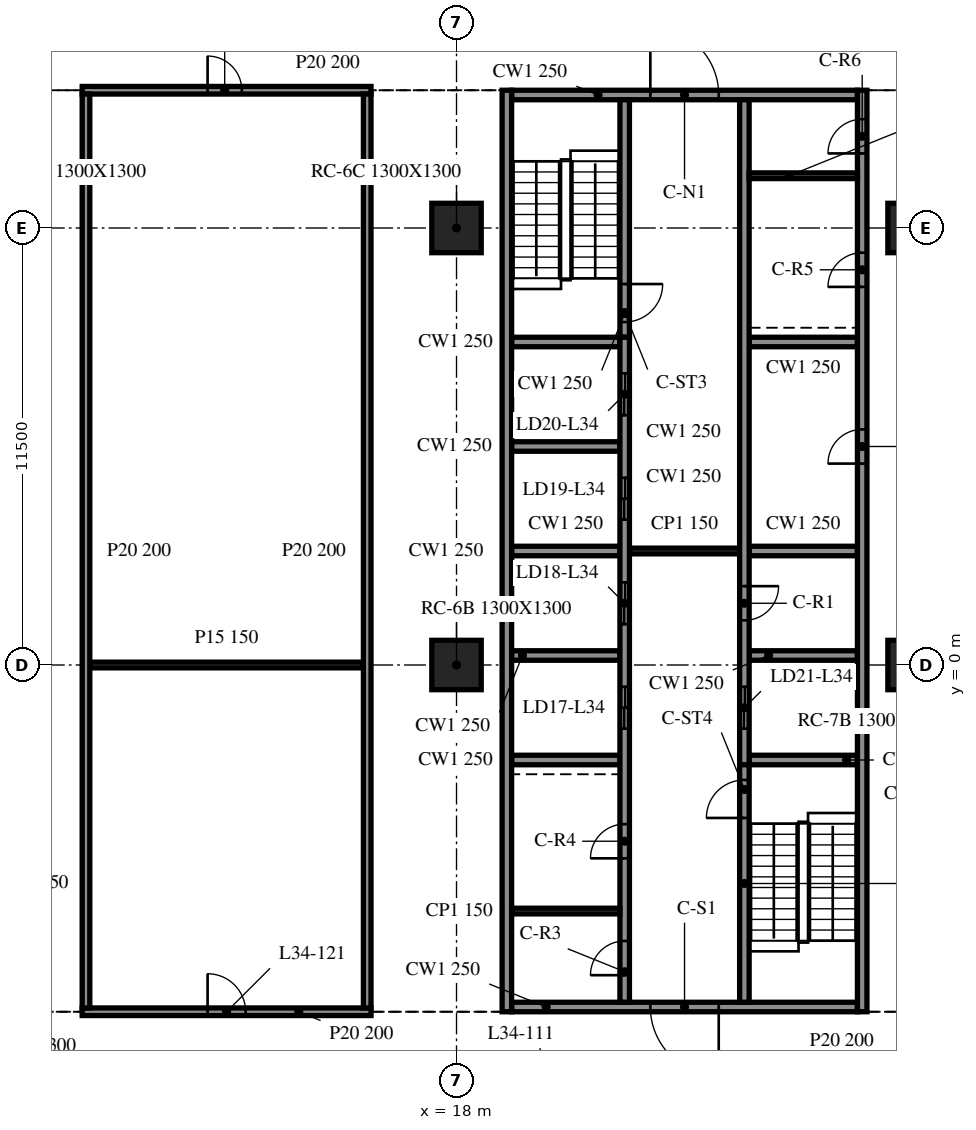
"""IFC4 building model, lengths in metres.
Left out: names, types, materials, properties, quantities, classifications, styles, units other than length and angle.
Written with IfcOpenShell. Run it as: python <this file> out.ifc"""

import sys

from ifc_helpers import new_model, si_unit, direction, frame, frame_2d, origin, origin_2d, place, context, subcontext, project, spatial, rectangle, extrude, element, fill, save


model = new_model("IFC4")
c1 = context("Model", 3, precision=1e-05, world=origin(), true_north=direction((0.0, 1.0)))
c2 = subcontext(c1, "Body", "Model", "MODEL_VIEW")
j1 = project(units=[si_unit("LENGTHUNIT", "METRE"), si_unit("PLANEANGLEUNIT", "RADIAN")], contexts=[c1])
p1 = place(None, origin())
s1 = spatial("IfcSite", under=j1, at=p1, CompositionType="ELEMENT")
p2 = place(p1, origin())
s2 = spatial("IfcBuilding", under=s1, at=p2, CompositionType="ELEMENT")
p3 = place(p2, frame((0.0, 0.0, 146.6)))
s3 = spatial("IfcBuildingStorey", under=s2, at=p3, CompositionType="ELEMENT", Elevation=146.6)
for number, where, z_axis, x_axis in (
    (1, (18.0, 0.0, -0.34), (0.0, 0.0, 1.0), (1.0, 0.0, 0.0)),
    (2, (18.0, 11.5, -0.34), (0.0, 0.0, 1.0), (1.0, 0.0, 0.0)),
    (3, (30.0, 0.0, -0.34), (0.0, 0.0, 1.0), (1.0, 0.0, 0.0)),
    (4, (30.0, 11.5, -0.34), (0.0, 0.0, 1.0), (1.0, 0.0, 0.0)),
):
    element("IfcColumn", number, at=place(p3, frame(where, z_axis=z_axis, x_axis=x_axis)), inside=s3, PredefinedType="COLUMN", context=c2, shape_type="SweptSolid", body=[
        extrude(rectangle(XDim=1.3, YDim=1.3, at=origin_2d()), origin(), (0.0, 0.0, 1.0), 4.1),
    ])
p4 = place(p3, frame((19.325, 15.125, 0.0), z_axis=(0.0, 0.0, 1.0), x_axis=(0.0, -1.0, 0.0)))
e5 = element("IfcWall", 5, at=p4, inside=s3, PredefinedType="SOLIDWALL", context=c2, shape_type="SweptSolid", body=[
    extrude(rectangle(XDim=24.25, YDim=0.25, at=frame_2d((12.125, 0.0))), origin(), (0.0, 0.0, 1.0), 3.76),
])
p5 = place(p3, frame((28.675, -9.125, 0.0), z_axis=(0.0, 0.0, 1.0), x_axis=(0.0, 1.0, 0.0)))
e6 = element("IfcWall", 6, at=p5, inside=s3, PredefinedType="SOLIDWALL", context=c2, shape_type="SweptSolid", body=[
    extrude(rectangle(XDim=24.25, YDim=0.25, at=frame_2d((12.125, 0.0))), origin(), (0.0, 0.0, 1.0), 3.76),
])
p6 = place(p5, frame((14.425, 0.0, 0.0)))
e7 = element("IfcOpeningElement", 7, at=p6, cuts=e6, PredefinedType="OPENING", context=c2, shape_type="SweptSolid", body=[
    extrude(rectangle(XDim=0.9, YDim=2.1, at=frame_2d((0.45, 1.05))), frame((0.0, 0.135, 0.0), z_axis=(0.0, -1.0, 0.0), x_axis=(1.0, 0.0, 0.0)), (0.0, 0.0, 1.0), 0.27),
])
p7 = place(p5, frame((19.075, 0.0, 0.0)))
e8 = element("IfcOpeningElement", 8, at=p7, cuts=e6, PredefinedType="OPENING", context=c2, shape_type="SweptSolid", body=[
    extrude(rectangle(XDim=0.9, YDim=2.1, at=frame_2d((0.45, 1.05))), frame((0.0, 0.135, 0.0), z_axis=(0.0, -1.0, 0.0), x_axis=(1.0, 0.0, 0.0)), (0.0, 0.0, 1.0), 0.27),
])
p8 = place(p5, frame((22.587, 0.0, 0.0)))
e9 = element("IfcOpeningElement", 9, at=p8, cuts=e6, PredefinedType="OPENING", context=c2, shape_type="SweptSolid", body=[
    extrude(rectangle(XDim=0.9, YDim=2.1, at=frame_2d((0.45, 1.05))), frame((0.0, 0.135, 0.0), z_axis=(0.0, -1.0, 0.0), x_axis=(1.0, 0.0, 0.0)), (0.0, 0.0, 1.0), 0.27),
])
p9 = place(p3, frame((28.55, -9.0, 0.0), z_axis=(0.0, 0.0, 1.0), x_axis=(-1.0, 0.0, 0.0)))
e10 = element("IfcWall", 10, at=p9, inside=s3, PredefinedType="SOLIDWALL", context=c2, shape_type="SweptSolid", body=[
    extrude(rectangle(XDim=9.1, YDim=0.25, at=frame_2d((4.55, 0.0))), origin(), (0.0, 0.0, 1.0), 3.76),
])
p10 = place(p9, frame((3.65, 0.0, 0.0)))
e11 = element("IfcOpeningElement", 11, at=p10, cuts=e10, PredefinedType="OPENING", context=c2, shape_type="SweptSolid", body=[
    extrude(rectangle(XDim=1.8, YDim=2.1, at=frame_2d((0.9, 1.05))), frame((0.0, 0.135, 0.0), z_axis=(0.0, -1.0, 0.0), x_axis=(1.0, 0.0, 0.0)), (0.0, 0.0, 1.0), 0.27),
])
p11 = place(p3, frame((19.45, 15.0, 0.0), z_axis=(0.0, 0.0, 1.0), x_axis=(1.0, 0.0, 0.0)))
e12 = element("IfcWall", 12, at=p11, inside=s3, PredefinedType="SOLIDWALL", context=c2, shape_type="SweptSolid", body=[
    extrude(rectangle(XDim=9.1, YDim=0.25, at=frame_2d((4.55, 0.0))), origin(), (0.0, 0.0, 1.0), 3.76),
])
p12 = place(p11, frame((3.65, 0.0, 0.0)))
e13 = element("IfcOpeningElement", 13, at=p12, cuts=e12, PredefinedType="OPENING", context=c2, shape_type="SweptSolid", body=[
    extrude(rectangle(XDim=1.8, YDim=2.1, at=frame_2d((0.9, 1.05))), frame((0.0, 0.135, 0.0), z_axis=(0.0, -1.0, 0.0), x_axis=(1.0, 0.0, 0.0)), (0.0, 0.0, 1.0), 0.27),
])
p13 = place(p3, frame((22.425, -8.875, 0.0), z_axis=(0.0, 0.0, 1.0), x_axis=(0.0, 1.0, 0.0)))
e14 = element("IfcWall", 14, at=p13, inside=s3, PredefinedType="SOLIDWALL", context=c2, shape_type="SweptSolid", body=[
    extrude(rectangle(XDim=17.5, YDim=0.25, at=frame_2d((8.75, 0.0))), origin(), (0.0, 0.0, 1.0), 3.76),
])
p14 = place(p13, frame((7.2, 0.0, 0.0)))
e15 = element("IfcOpeningElement", 15, at=p14, cuts=e14, PredefinedType="OPENING", context=c2, shape_type="SweptSolid", body=[
    extrude(rectangle(XDim=1.1, YDim=2.1, at=frame_2d((0.55, 1.05))), frame((0.0, 0.135, 0.0), z_axis=(0.0, -1.0, 0.0), x_axis=(1.0, 0.0, 0.0)), (0.0, 0.0, 1.0), 0.27),
])
p15 = place(p13, frame((9.95, 0.0, 0.0)))
e16 = element("IfcOpeningElement", 16, at=p15, cuts=e14, PredefinedType="OPENING", context=c2, shape_type="SweptSolid", body=[
    extrude(rectangle(XDim=1.1, YDim=2.1, at=frame_2d((0.55, 1.05))), frame((0.0, 0.135, 0.0), z_axis=(0.0, -1.0, 0.0), x_axis=(1.0, 0.0, 0.0)), (0.0, 0.0, 1.0), 0.27),
])
p16 = place(p13, frame((12.7, 0.0, 0.0)))
e17 = element("IfcOpeningElement", 17, at=p16, cuts=e14, PredefinedType="OPENING", context=c2, shape_type="SweptSolid", body=[
    extrude(rectangle(XDim=1.1, YDim=2.1, at=frame_2d((0.55, 1.05))), frame((0.0, 0.135, 0.0), z_axis=(0.0, -1.0, 0.0), x_axis=(1.0, 0.0, 0.0)), (0.0, 0.0, 1.0), 0.27),
])
p17 = place(p13, frame((15.45, 0.0, 0.0)))
e18 = element("IfcOpeningElement", 18, at=p17, cuts=e14, PredefinedType="OPENING", context=c2, shape_type="SweptSolid", body=[
    extrude(rectangle(XDim=1.1, YDim=2.1, at=frame_2d((0.55, 1.05))), frame((0.0, 0.135, 0.0), z_axis=(0.0, -1.0, 0.0), x_axis=(1.0, 0.0, 0.0)), (0.0, 0.0, 1.0), 0.27),
])
p18 = place(p13, frame((0.712, 0.0, 0.0)))
e19 = element("IfcOpeningElement", 19, at=p18, cuts=e14, PredefinedType="OPENING", context=c2, shape_type="SweptSolid", body=[
    extrude(rectangle(XDim=0.9, YDim=2.1, at=frame_2d((0.45, 1.05))), frame((0.0, 0.135, 0.0), z_axis=(0.0, -1.0, 0.0), x_axis=(1.0, 0.0, 0.0)), (0.0, 0.0, 1.0), 0.27),
])
p19 = place(p13, frame((3.788, 0.0, 0.0)))
e20 = element("IfcOpeningElement", 20, at=p19, cuts=e14, PredefinedType="OPENING", context=c2, shape_type="SweptSolid", body=[
    extrude(rectangle(XDim=0.9, YDim=2.1, at=frame_2d((0.45, 1.05))), frame((0.0, 0.135, 0.0), z_axis=(0.0, -1.0, 0.0), x_axis=(1.0, 0.0, 0.0)), (0.0, 0.0, 1.0), 0.27),
])
p20 = place(p3, frame((22.425, 14.875, 0.0), z_axis=(0.0, 0.0, 1.0), x_axis=(0.0, -1.0, 0.0)))
e21 = element("IfcWall", 21, at=p20, inside=s3, PredefinedType="SOLIDWALL", context=c2, shape_type="SweptSolid", body=[
    extrude(rectangle(XDim=6.25, YDim=0.25, at=frame_2d((3.125, 0.0))), origin(), (0.0, 0.0, 1.0), 3.76),
])
p21 = place(p20, frame((4.85, 0.0, 0.0)))
e22 = element("IfcOpeningElement", 22, at=p21, cuts=e21, PredefinedType="OPENING", context=c2, shape_type="SweptSolid", body=[
    extrude(rectangle(XDim=1.0, YDim=2.1, at=frame_2d((0.5, 1.05))), frame((0.0, 0.135, 0.0), z_axis=(0.0, -1.0, 0.0), x_axis=(1.0, 0.0, 0.0)), (0.0, 0.0, 1.0), 0.27),
])
p22 = place(p3, frame((25.575, -8.875, 0.0), z_axis=(0.0, 0.0, 1.0), x_axis=(0.0, 1.0, 0.0)))
e23 = element("IfcWall", 23, at=p22, inside=s3, PredefinedType="SOLIDWALL", context=c2, shape_type="SweptSolid", body=[
    extrude(rectangle(XDim=6.25, YDim=0.25, at=frame_2d((3.125, 0.0))), origin(), (0.0, 0.0, 1.0), 3.76),
])
p23 = place(p22, frame((4.85, 0.0, 0.0)))
e24 = element("IfcOpeningElement", 24, at=p23, cuts=e23, PredefinedType="OPENING", context=c2, shape_type="SweptSolid", body=[
    extrude(rectangle(XDim=1.0, YDim=2.1, at=frame_2d((0.5, 1.05))), frame((0.0, 0.135, 0.0), z_axis=(0.0, -1.0, 0.0), x_axis=(1.0, 0.0, 0.0)), (0.0, 0.0, 1.0), 0.27),
])
p24 = place(p3, frame((25.575, 14.875, 0.0), z_axis=(0.0, 0.0, 1.0), x_axis=(0.0, -1.0, 0.0)))
e25 = element("IfcWall", 25, at=p24, inside=s3, PredefinedType="SOLIDWALL", context=c2, shape_type="SweptSolid", body=[
    extrude(rectangle(XDim=17.5, YDim=0.25, at=frame_2d((8.75, 0.0))), origin(), (0.0, 0.0, 1.0), 3.76),
])
p25 = place(p24, frame((15.45, 0.0, 0.0)))
e26 = element("IfcOpeningElement", 26, at=p25, cuts=e25, PredefinedType="OPENING", context=c2, shape_type="SweptSolid", body=[
    extrude(rectangle(XDim=1.1, YDim=2.1, at=frame_2d((0.55, 1.05))), frame((0.0, 0.135, 0.0), z_axis=(0.0, -1.0, 0.0), x_axis=(1.0, 0.0, 0.0)), (0.0, 0.0, 1.0), 0.27),
])
p26 = place(p24, frame((12.8, 0.0, 0.0)))
e27 = element("IfcOpeningElement", 27, at=p26, cuts=e25, PredefinedType="OPENING", context=c2, shape_type="SweptSolid", body=[
    extrude(rectangle(XDim=0.9, YDim=2.1, at=frame_2d((0.45, 1.05))), frame((0.0, 0.135, 0.0), z_axis=(0.0, -1.0, 0.0), x_axis=(1.0, 0.0, 0.0)), (0.0, 0.0, 1.0), 0.27),
])
for number, where, z_axis, x_axis in (
    (28, (19.45, -2.5, 0.0), (0.0, 0.0, 1.0), (1.0, 0.0, 0.0)),
    (29, (19.45, 0.25, 0.0), (0.0, 0.0, 1.0), (1.0, 0.0, 0.0)),
    (30, (19.45, 3.0, 0.0), (0.0, 0.0, 1.0), (1.0, 0.0, 0.0)),
    (31, (19.45, 5.75, 0.0), (0.0, 0.0, 1.0), (1.0, 0.0, 0.0)),
    (32, (19.45, 8.5, 0.0), (0.0, 0.0, 1.0), (1.0, 0.0, 0.0)),
    (33, (25.7, -2.5, 0.0), (0.0, 0.0, 1.0), (1.0, 0.0, 0.0)),
    (34, (25.7, 0.25, 0.0), (0.0, 0.0, 1.0), (1.0, 0.0, 0.0)),
    (35, (25.7, 3.0, 0.0), (0.0, 0.0, 1.0), (1.0, 0.0, 0.0)),
    (36, (25.7, 8.5, 0.0), (0.0, 0.0, 1.0), (1.0, 0.0, 0.0)),
):
    element("IfcWall", number, at=place(p3, frame(where, z_axis=z_axis, x_axis=x_axis)), inside=s3, PredefinedType="SOLIDWALL", context=c2, shape_type="SweptSolid", body=[
        extrude(rectangle(XDim=2.85, YDim=0.25, at=frame_2d((1.425, 0.0))), origin(), (0.0, 0.0, 1.0), 3.76),
    ])
p27 = place(p3, frame((22.55, 3.0, 0.0), z_axis=(0.0, 0.0, 1.0), x_axis=(1.0, 0.0, 0.0)))
e37 = element("IfcWall", 37, at=p27, inside=s3, PredefinedType="PARTITIONING", context=c2, shape_type="SweptSolid", body=[
    extrude(rectangle(XDim=2.9, YDim=0.15, at=frame_2d((1.45, 0.0))), origin(), (0.0, 0.0, 1.0), 3.76),
])
for number, where, z_axis, x_axis in (
    (38, (19.45, -6.475, 0.0), (0.0, 0.0, 1.0), (1.0, 0.0, 0.0)),
    (39, (25.7, 12.875, 0.0), (0.0, 0.0, 1.0), (1.0, 0.0, 0.0)),
):
    element("IfcWall", number, at=place(p3, frame(where, z_axis=z_axis, x_axis=x_axis)), inside=s3, PredefinedType="PARTITIONING", context=c2, shape_type="SweptSolid", body=[
        extrude(rectangle(XDim=2.85, YDim=0.15, at=frame_2d((1.425, 0.0))), origin(), (0.0, 0.0, 1.0), 3.76),
    ])
p28 = place(p3, frame((8.15, -9.125, 0.0), z_axis=(0.0, 0.0, 1.0), x_axis=(1.0, 0.0, 0.0)))
e40 = element("IfcWall", 40, at=p28, inside=s3, PredefinedType="PARTITIONING", context=c2, shape_type="SweptSolid", body=[
    extrude(rectangle(XDim=7.6, YDim=0.2, at=frame_2d((3.8, 0.0))), origin(), (0.0, 0.0, 1.0), 3.76),
])
p29 = place(p28, frame((3.3, 0.0, 0.0)))
e41 = element("IfcOpeningElement", 41, at=p29, cuts=e40, PredefinedType="OPENING", context=c2, shape_type="SweptSolid", body=[
    extrude(rectangle(XDim=1.0, YDim=2.1, at=frame_2d((0.5, 1.05))), frame((0.0, 0.11, 0.0), z_axis=(0.0, -1.0, 0.0), x_axis=(1.0, 0.0, 0.0)), (0.0, 0.0, 1.0), 0.22),
])
p30 = place(p3, frame((8.35, 0.0, 0.0), z_axis=(0.0, 0.0, 1.0), x_axis=(1.0, 0.0, 0.0)))
e42 = element("IfcWall", 42, at=p30, inside=s3, PredefinedType="PARTITIONING", context=c2, shape_type="SweptSolid", body=[
    extrude(rectangle(XDim=7.2, YDim=0.15, at=frame_2d((3.6, 0.0))), origin(), (0.0, 0.0, 1.0), 3.76),
])
p31 = place(p3, frame((8.15, 15.125, 0.0), z_axis=(0.0, 0.0, 1.0), x_axis=(1.0, 0.0, 0.0)))
e43 = element("IfcWall", 43, at=p31, inside=s3, PredefinedType="PARTITIONING", context=c2, shape_type="SweptSolid", body=[
    extrude(rectangle(XDim=7.6, YDim=0.2, at=frame_2d((3.8, 0.0))), origin(), (0.0, 0.0, 1.0), 3.76),
])
p32 = place(p31, frame((3.3, 0.0, 0.0)))
e44 = element("IfcOpeningElement", 44, at=p32, cuts=e43, PredefinedType="OPENING", context=c2, shape_type="SweptSolid", body=[
    extrude(rectangle(XDim=0.9, YDim=2.1, at=frame_2d((0.45, 1.05))), frame((0.0, 0.11, 0.0), z_axis=(0.0, -1.0, 0.0), x_axis=(1.0, 0.0, 0.0)), (0.0, 0.0, 1.0), 0.22),
])
for number, where, z_axis, x_axis in (
    (45, (8.25, -9.025, 0.0), (0.0, 0.0, 1.0), (0.0, 1.0, 0.0)),
    (46, (15.65, -9.025, 0.0), (0.0, 0.0, 1.0), (0.0, 1.0, 0.0)),
):
    element("IfcWall", number, at=place(p3, frame(where, z_axis=z_axis, x_axis=x_axis)), inside=s3, PredefinedType="PARTITIONING", context=c2, shape_type="SweptSolid", body=[
        extrude(rectangle(XDim=24.05, YDim=0.2, at=frame_2d((12.025, 0.0))), origin(), (0.0, 0.0, 1.0), 3.76),
    ])
p33 = place(p10, origin())
e47 = element("IfcDoor", 47, at=p33, inside=s3, OperationType="DOUBLE_DOOR_SINGLE_SWING", PredefinedType="DOOR", context=c2, shape_type="SweptSolid", body=[
    extrude(rectangle(XDim=1.8, YDim=2.1, at=frame_2d((0.9, 1.05))), frame((0.0, 0.025, 0.0), z_axis=(0.0, -1.0, 0.0), x_axis=(1.0, 0.0, 0.0)), (0.0, 0.0, 1.0), 0.05),
])
fill(e11, e47)
p34 = place(p12, origin())
e48 = element("IfcDoor", 48, at=p34, inside=s3, OperationType="DOUBLE_DOOR_SINGLE_SWING", PredefinedType="DOOR", context=c2, shape_type="SweptSolid", body=[
    extrude(rectangle(XDim=1.8, YDim=2.1, at=frame_2d((0.9, 1.05))), frame((0.0, 0.025, 0.0), z_axis=(0.0, -1.0, 0.0), x_axis=(1.0, 0.0, 0.0)), (0.0, 0.0, 1.0), 0.05),
])
fill(e13, e48)
p35 = place(p25, origin())
e49 = element("IfcDoor", 49, at=p35, inside=s3, OperationType="DOUBLE_DOOR_SLIDING", PredefinedType="DOOR", context=c2, shape_type="SweptSolid", body=[
    extrude(rectangle(XDim=1.1, YDim=2.1, at=frame_2d((0.55, 1.05))), frame((0.0, 0.025, 0.0), z_axis=(0.0, -1.0, 0.0), x_axis=(1.0, 0.0, 0.0)), (0.0, 0.0, 1.0), 0.05),
])
fill(e26, e49)
p36 = place(p14, origin())
e50 = element("IfcDoor", 50, at=p36, inside=s3, OperationType="DOUBLE_DOOR_SLIDING", PredefinedType="DOOR", context=c2, shape_type="SweptSolid", body=[
    extrude(rectangle(XDim=1.1, YDim=2.1, at=frame_2d((0.55, 1.05))), frame((0.0, 0.025, 0.0), z_axis=(0.0, -1.0, 0.0), x_axis=(1.0, 0.0, 0.0)), (0.0, 0.0, 1.0), 0.05),
])
fill(e15, e50)
p37 = place(p15, origin())
e51 = element("IfcDoor", 51, at=p37, inside=s3, OperationType="DOUBLE_DOOR_SLIDING", PredefinedType="DOOR", context=c2, shape_type="SweptSolid", body=[
    extrude(rectangle(XDim=1.1, YDim=2.1, at=frame_2d((0.55, 1.05))), frame((0.0, 0.025, 0.0), z_axis=(0.0, -1.0, 0.0), x_axis=(1.0, 0.0, 0.0)), (0.0, 0.0, 1.0), 0.05),
])
fill(e16, e51)
p38 = place(p16, origin())
e52 = element("IfcDoor", 52, at=p38, inside=s3, OperationType="DOUBLE_DOOR_SLIDING", PredefinedType="DOOR", context=c2, shape_type="SweptSolid", body=[
    extrude(rectangle(XDim=1.1, YDim=2.1, at=frame_2d((0.55, 1.05))), frame((0.0, 0.025, 0.0), z_axis=(0.0, -1.0, 0.0), x_axis=(1.0, 0.0, 0.0)), (0.0, 0.0, 1.0), 0.05),
])
fill(e17, e52)
p39 = place(p17, origin())
e53 = element("IfcDoor", 53, at=p39, inside=s3, OperationType="DOUBLE_DOOR_SLIDING", PredefinedType="DOOR", context=c2, shape_type="SweptSolid", body=[
    extrude(rectangle(XDim=1.1, YDim=2.1, at=frame_2d((0.55, 1.05))), frame((0.0, 0.025, 0.0), z_axis=(0.0, -1.0, 0.0), x_axis=(1.0, 0.0, 0.0)), (0.0, 0.0, 1.0), 0.05),
])
fill(e18, e53)
p40 = place(p26, origin())
e54 = element("IfcDoor", 54, at=p40, inside=s3, OperationType="SINGLE_SWING_LEFT", PredefinedType="DOOR", context=c2, shape_type="SweptSolid", body=[
    extrude(rectangle(XDim=0.9, YDim=2.1, at=frame_2d((0.45, 1.05))), frame((0.0, 0.025, 0.0), z_axis=(0.0, -1.0, 0.0), x_axis=(1.0, 0.0, 0.0)), (0.0, 0.0, 1.0), 0.05),
])
fill(e27, e54)
p41 = place(p6, origin())
e55 = element("IfcDoor", 55, at=p41, inside=s3, OperationType="SINGLE_SWING_RIGHT", PredefinedType="DOOR", context=c2, shape_type="SweptSolid", body=[
    extrude(rectangle(XDim=0.9, YDim=2.1, at=frame_2d((0.45, 1.05))), frame((0.0, 0.025, 0.0), z_axis=(0.0, -1.0, 0.0), x_axis=(1.0, 0.0, 0.0)), (0.0, 0.0, 1.0), 0.05),
])
fill(e7, e55)
p42 = place(p18, origin())
e56 = element("IfcDoor", 56, at=p42, inside=s3, OperationType="SINGLE_SWING_LEFT", PredefinedType="DOOR", context=c2, shape_type="SweptSolid", body=[
    extrude(rectangle(XDim=0.9, YDim=2.1, at=frame_2d((0.45, 1.05))), frame((0.0, 0.025, 0.0), z_axis=(0.0, -1.0, 0.0), x_axis=(1.0, 0.0, 0.0)), (0.0, 0.0, 1.0), 0.05),
])
fill(e19, e56)
p43 = place(p19, origin())
e57 = element("IfcDoor", 57, at=p43, inside=s3, OperationType="SINGLE_SWING_RIGHT", PredefinedType="DOOR", context=c2, shape_type="SweptSolid", body=[
    extrude(rectangle(XDim=0.9, YDim=2.1, at=frame_2d((0.45, 1.05))), frame((0.0, 0.025, 0.0), z_axis=(0.0, -1.0, 0.0), x_axis=(1.0, 0.0, 0.0)), (0.0, 0.0, 1.0), 0.05),
])
fill(e20, e57)
p44 = place(p7, origin())
e58 = element("IfcDoor", 58, at=p44, inside=s3, OperationType="SINGLE_SWING_LEFT", PredefinedType="DOOR", context=c2, shape_type="SweptSolid", body=[
    extrude(rectangle(XDim=0.9, YDim=2.1, at=frame_2d((0.45, 1.05))), frame((0.0, 0.025, 0.0), z_axis=(0.0, -1.0, 0.0), x_axis=(1.0, 0.0, 0.0)), (0.0, 0.0, 1.0), 0.05),
])
fill(e8, e58)
p45 = place(p8, origin())
e59 = element("IfcDoor", 59, at=p45, inside=s3, OperationType="SINGLE_SWING_RIGHT", PredefinedType="DOOR", context=c2, shape_type="SweptSolid", body=[
    extrude(rectangle(XDim=0.9, YDim=2.1, at=frame_2d((0.45, 1.05))), frame((0.0, 0.025, 0.0), z_axis=(0.0, -1.0, 0.0), x_axis=(1.0, 0.0, 0.0)), (0.0, 0.0, 1.0), 0.05),
])
fill(e9, e59)
p46 = place(p21, origin())
e60 = element("IfcDoor", 60, at=p46, inside=s3, OperationType="SINGLE_SWING_LEFT", PredefinedType="DOOR", context=c2, shape_type="SweptSolid", body=[
    extrude(rectangle(XDim=1.0, YDim=2.1, at=frame_2d((0.5, 1.05))), frame((0.0, 0.025, 0.0), z_axis=(0.0, -1.0, 0.0), x_axis=(1.0, 0.0, 0.0)), (0.0, 0.0, 1.0), 0.05),
])
fill(e22, e60)
p47 = place(p23, origin())
e61 = element("IfcDoor", 61, at=p47, inside=s3, OperationType="SINGLE_SWING_RIGHT", PredefinedType="DOOR", context=c2, shape_type="SweptSolid", body=[
    extrude(rectangle(XDim=1.0, YDim=2.1, at=frame_2d((0.5, 1.05))), frame((0.0, 0.025, 0.0), z_axis=(0.0, -1.0, 0.0), x_axis=(1.0, 0.0, 0.0)), (0.0, 0.0, 1.0), 0.05),
])
fill(e24, e61)
p48 = place(p29, origin())
e62 = element("IfcDoor", 62, at=p48, inside=s3, OperationType="SINGLE_SWING_RIGHT", PredefinedType="DOOR", context=c2, shape_type="SweptSolid", body=[
    extrude(rectangle(XDim=1.0, YDim=2.1, at=frame_2d((0.5, 1.05))), frame((0.0, 0.025, 0.0), z_axis=(0.0, -1.0, 0.0), x_axis=(1.0, 0.0, 0.0)), (0.0, 0.0, 1.0), 0.05),
])
fill(e41, e62)
p49 = place(p32, origin())
e63 = element("IfcDoor", 63, at=p49, inside=s3, OperationType="SINGLE_SWING_RIGHT", PredefinedType="DOOR", context=c2, shape_type="SweptSolid", body=[
    extrude(rectangle(XDim=0.9, YDim=2.1, at=frame_2d((0.45, 1.05))), frame((0.0, 0.025, 0.0), z_axis=(0.0, -1.0, 0.0), x_axis=(1.0, 0.0, 0.0)), (0.0, 0.0, 1.0), 0.05),
])
fill(e44, e63)
save(model, sys.argv[1])
